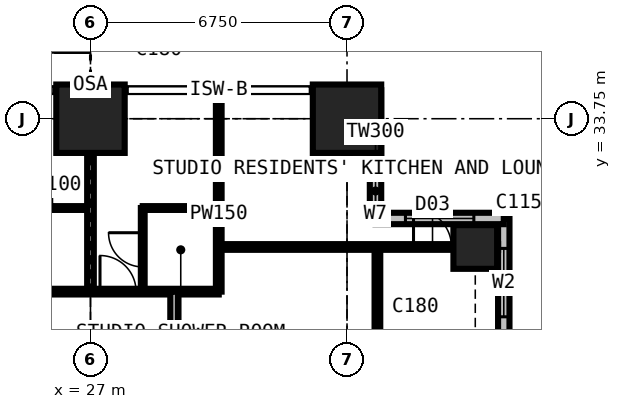
"""IFC4 building model, lengths in metres.
Left out: names, types, materials, properties, quantities, classifications, styles, units other than length and angle.
Written with IfcOpenShell. Run it as: python <this file> out.ifc"""

import sys

from ifc_helpers import new_model, si_unit, direction, frame, frame_2d, origin, origin_2d, place, context, subcontext, project, spatial, rectangle, extrude, element, fill, save


model = new_model("IFC4")
c1 = context("Model", 3, precision=1e-05, world=origin(), true_north=direction((0.0, 1.0)))
c2 = subcontext(c1, "Body", "Model", "MODEL_VIEW")
j1 = project(units=[si_unit("LENGTHUNIT", "METRE"), si_unit("PLANEANGLEUNIT", "RADIAN")], contexts=[c1])
p1 = place(None, origin())
s1 = spatial("IfcSite", under=j1, at=p1, CompositionType="ELEMENT")
p2 = place(p1, origin())
s2 = spatial("IfcBuilding", under=s1, at=p2, CompositionType="ELEMENT")
p3 = place(p2, frame((0.0, 0.0, 87.3)))
s3 = spatial("IfcBuildingStorey", under=s2, at=p3, CompositionType="ELEMENT", Elevation=87.3)
for number, where, z_axis, x_axis in (
    (1, (27.0, 33.75, 0.0), (0.0, 0.0, 1.0), (1.0, 0.0, 0.0)),
    (2, (33.75, 33.75, 0.0), (0.0, 0.0, 1.0), (1.0, 0.0, 0.0)),
):
    element("IfcColumn", number, at=place(p3, frame(where, z_axis=z_axis, x_axis=x_axis)), inside=s3, PredefinedType="COLUMN", context=c2, shape_type="SweptSolid", body=[
        extrude(rectangle(XDim=1.8, YDim=1.8, at=origin_2d()), origin(), (0.0, 0.0, 1.0), 3.6),
    ])
p4 = place(p3, frame((37.125, 30.375, 0.0), z_axis=(0.0, 0.0, 1.0), x_axis=(1.0, 0.0, 0.0)))
e3 = element("IfcColumn", 3, at=p4, inside=s3, PredefinedType="COLUMN", context=c2, shape_type="SweptSolid", body=[
    extrude(rectangle(XDim=1.15, YDim=1.15, at=origin_2d()), origin(), (0.0, 0.0, 1.0), 3.6),
])
p5 = place(p3, frame((37.875, 27.75, 0.0), z_axis=(0.0, 0.0, 1.0), x_axis=(0.0, 1.0, 0.0)))
e4 = element("IfcWall", 4, at=p5, inside=s3, PredefinedType="SOLIDWALL", context=c2, shape_type="SweptSolid", body=[
    extrude(rectangle(XDim=3.375, YDim=0.3, at=frame_2d((1.688, 0.0))), origin(), (0.0, 0.0, 1.0), 3.375),
])
p6 = place(p5, frame((0.788, 0.0, 0.6)))
e5 = element("IfcOpeningElement", 5, at=p6, cuts=e4, PredefinedType="OPENING", context=c2, shape_type="SweptSolid", body=[
    extrude(rectangle(XDim=1.8, YDim=2.1, at=frame_2d((0.9, 1.05))), frame((0.0, 0.16, 0.0), z_axis=(0.0, -1.0, 0.0), x_axis=(1.0, 0.0, 0.0)), (0.0, 0.0, 1.0), 0.32),
])
p7 = place(p3, frame((37.875, 31.125, 0.0), z_axis=(0.0, 0.0, 1.0), x_axis=(-1.0, 0.0, 0.0)))
e6 = element("IfcWall", 6, at=p7, inside=s3, PredefinedType="SOLIDWALL", context=c2, shape_type="SweptSolid", body=[
    extrude(rectangle(XDim=3.375, YDim=0.3, at=frame_2d((1.688, 0.0))), origin(), (0.0, 0.0, 1.0), 3.375),
])
p8 = place(p7, frame((0.788, 0.0, 0.6)))
e7 = element("IfcOpeningElement", 7, at=p8, cuts=e6, PredefinedType="OPENING", context=c2, shape_type="SweptSolid", body=[
    extrude(rectangle(XDim=1.8, YDim=2.1, at=frame_2d((0.9, 1.05))), frame((0.0, 0.16, 0.0), z_axis=(0.0, -1.0, 0.0), x_axis=(1.0, 0.0, 0.0)), (0.0, 0.0, 1.0), 0.32),
])
p9 = place(p3, frame((34.5, 31.125, 0.0), z_axis=(0.0, 0.0, 1.0), x_axis=(0.0, 1.0, 0.0)))
e8 = element("IfcWall", 8, at=p9, inside=s3, PredefinedType="SOLIDWALL", context=c2, shape_type="SweptSolid", body=[
    extrude(rectangle(XDim=3.375, YDim=0.3, at=frame_2d((1.688, 0.0))), origin(), (0.0, 0.0, 1.0), 3.375),
])
p10 = place(p9, frame((0.272, 0.0, 0.9)))
e9 = element("IfcOpeningElement", 9, at=p10, cuts=e8, PredefinedType="OPENING", context=c2, shape_type="SweptSolid", body=[
    extrude(rectangle(XDim=0.9, YDim=1.8, at=frame_2d((0.45, 0.9))), frame((0.0, 0.16, 0.0), z_axis=(0.0, -1.0, 0.0), x_axis=(1.0, 0.0, 0.0)), (0.0, 0.0, 1.0), 0.32),
])
p11 = place(p3, frame((11.3, 29.2, 0.0), z_axis=(0.0, 0.0, 1.0), x_axis=(1.0, 0.0, 0.0)))
e10 = element("IfcWall", 10, at=p11, inside=s3, PredefinedType="PARTITIONING", context=c2, shape_type="SweptSolid", body=[
    extrude(rectangle(XDim=19.075, YDim=0.15, at=frame_2d((9.538, 0.0))), origin(), (0.0, 0.0, 1.0), 3.375),
])
p12 = place(p11, frame((5.825, 0.0, 0.0)))
e11 = element("IfcOpeningElement", 11, at=p12, cuts=e10, PredefinedType="OPENING", context=c2, shape_type="SweptSolid", body=[
    extrude(rectangle(XDim=0.95, YDim=2.2, at=frame_2d((0.475, 1.1))), frame((0.0, 0.085, 0.0), z_axis=(0.0, -1.0, 0.0), x_axis=(1.0, 0.0, 0.0)), (0.0, 0.0, 1.0), 0.17),
])
p13 = place(p11, frame((9.2, 0.0, 0.0)))
e12 = element("IfcOpeningElement", 12, at=p13, cuts=e10, PredefinedType="OPENING", context=c2, shape_type="SweptSolid", body=[
    extrude(rectangle(XDim=0.95, YDim=2.2, at=frame_2d((0.475, 1.1))), frame((0.0, 0.085, 0.0), z_axis=(0.0, -1.0, 0.0), x_axis=(1.0, 0.0, 0.0)), (0.0, 0.0, 1.0), 0.17),
])
p14 = place(p11, frame((12.575, 0.0, 0.0)))
e13 = element("IfcOpeningElement", 13, at=p14, cuts=e10, PredefinedType="OPENING", context=c2, shape_type="SweptSolid", body=[
    extrude(rectangle(XDim=0.95, YDim=2.2, at=frame_2d((0.475, 1.1))), frame((0.0, 0.085, 0.0), z_axis=(0.0, -1.0, 0.0), x_axis=(1.0, 0.0, 0.0)), (0.0, 0.0, 1.0), 0.17),
])
p15 = place(p11, frame((15.95, 0.0, 0.0)))
e14 = element("IfcOpeningElement", 14, at=p15, cuts=e10, PredefinedType="OPENING", context=c2, shape_type="SweptSolid", body=[
    extrude(rectangle(XDim=0.95, YDim=2.2, at=frame_2d((0.475, 1.1))), frame((0.0, 0.085, 0.0), z_axis=(0.0, -1.0, 0.0), x_axis=(1.0, 0.0, 0.0)), (0.0, 0.0, 1.0), 0.17),
])
p16 = place(p11, frame((0.6, 0.0, 0.0)))
e15 = element("IfcOpeningElement", 15, at=p16, cuts=e10, PredefinedType="OPENING", context=c2, shape_type="SweptSolid", body=[
    extrude(rectangle(XDim=1.0, YDim=2.2, at=frame_2d((0.5, 1.1))), frame((0.0, 0.085, 0.0), z_axis=(0.0, -1.0, 0.0), x_axis=(1.0, 0.0, 0.0)), (0.0, 0.0, 1.0), 0.17),
])
p17 = place(p3, frame((25.0, 31.4, 0.0), z_axis=(0.0, 0.0, 1.0), x_axis=(1.0, 0.0, 0.0)))
e16 = element("IfcWall", 16, at=p17, inside=s3, PredefinedType="PARTITIONING", context=c2, shape_type="SweptSolid", body=[
    extrude(rectangle(XDim=2.0, YDim=0.1, at=frame_2d((1.0, 0.0))), origin(), (0.0, 0.0, 1.0), 3.375),
])
p18 = place(p3, frame((27.0, 29.2, 0.0), z_axis=(0.0, 0.0, 1.0), x_axis=(0.0, 1.0, 0.0)))
e17 = element("IfcWall", 17, at=p18, inside=s3, PredefinedType="PARTITIONING", context=c2, shape_type="SweptSolid", body=[
    extrude(rectangle(XDim=5.284, YDim=0.175, at=frame_2d((2.642, 0.0))), origin(), (0.0, 0.0, 1.0), 2.61),
])
p19 = place(p3, frame((28.375, 29.2, 0.0), z_axis=(0.0, 0.0, 1.0), x_axis=(0.0, 1.0, 0.0)))
e18 = element("IfcWall", 18, at=p19, inside=s3, PredefinedType="PARTITIONING", context=c2, shape_type="SweptSolid", body=[
    extrude(rectangle(XDim=2.2, YDim=0.1, at=frame_2d((1.1, 0.0))), origin(), (0.0, 0.0, 1.0), 3.375),
])
p20 = place(p19, frame((0.65, 0.0, 0.0)))
e19 = element("IfcOpeningElement", 19, at=p20, cuts=e18, PredefinedType="OPENING", context=c2, shape_type="SweptSolid", body=[
    extrude(rectangle(XDim=0.9, YDim=2.2, at=frame_2d((0.45, 1.1))), frame((0.0, 0.06, 0.0), z_axis=(0.0, -1.0, 0.0), x_axis=(1.0, 0.0, 0.0)), (0.0, 0.0, 1.0), 0.12),
])
p21 = place(p3, frame((28.375, 31.4, 0.0), z_axis=(0.0, 0.0, 1.0), x_axis=(1.0, 0.0, 0.0)))
e20 = element("IfcWall", 20, at=p21, inside=s3, PredefinedType="PARTITIONING", context=c2, shape_type="SweptSolid", body=[
    extrude(rectangle(XDim=2.0, YDim=0.1, at=frame_2d((1.0, 0.0))), origin(), (0.0, 0.0, 1.0), 3.375),
])
p22 = place(p3, frame((29.2, 11.3, 0.0), z_axis=(0.0, 0.0, 1.0), x_axis=(0.0, 1.0, 0.0)))
e21 = element("IfcWall", 21, at=p22, inside=s3, PredefinedType="PARTITIONING", context=c2, shape_type="SweptSolid", body=[
    extrude(rectangle(XDim=17.9, YDim=0.2, at=frame_2d((8.95, 0.0))), origin(), (0.0, 0.0, 1.0), 3.375),
])
p23 = place(p22, frame((8.35, 0.0, 0.0)))
e22 = element("IfcOpeningElement", 22, at=p23, cuts=e21, PredefinedType="OPENING", context=c2, shape_type="SweptSolid", body=[
    extrude(rectangle(XDim=1.2, YDim=2.2, at=frame_2d((0.6, 1.1))), frame((0.0, 0.11, 0.0), z_axis=(0.0, -1.0, 0.0), x_axis=(1.0, 0.0, 0.0)), (0.0, 0.0, 1.0), 0.22),
])
p24 = place(p3, frame((30.375, 29.2, 0.0), z_axis=(0.0, 0.0, 1.0), x_axis=(0.0, 1.0, 0.0)))
e23 = element("IfcWall", 23, at=p24, inside=s3, PredefinedType="PARTITIONING", context=c2, shape_type="SweptSolid", body=[
    extrude(rectangle(XDim=5.284, YDim=0.15, at=frame_2d((2.642, 0.0))), origin(), (0.0, 0.0, 1.0), 3.375),
])
p25 = place(p3, frame((30.375, 30.375, 0.0), z_axis=(0.0, 0.0, 1.0), x_axis=(1.0, 0.0, 0.0)))
e24 = element("IfcWall", 24, at=p25, inside=s3, PredefinedType="PARTITIONING", context=c2, shape_type="SweptSolid", body=[
    extrude(rectangle(XDim=7.35, YDim=0.15, at=frame_2d((3.675, 0.0))), origin(), (0.0, 0.0, 1.0), 2.877),
])
p26 = place(p25, frame((5.125, 0.0, 0.0)))
e25 = element("IfcOpeningElement", 25, at=p26, cuts=e24, PredefinedType="OPENING", context=c2, shape_type="SweptSolid", body=[
    extrude(rectangle(XDim=1.0, YDim=2.2, at=frame_2d((0.5, 1.1))), frame((0.0, 0.085, 0.0), z_axis=(0.0, -1.0, 0.0), x_axis=(1.0, 0.0, 0.0)), (0.0, 0.0, 1.0), 0.17),
])
p27 = place(p3, frame((33.75, 32.57, 0.0), z_axis=(0.0, 0.0, 1.0), x_axis=(0.0, 1.0, 0.0)))
e26 = element("IfcWall", 26, at=p27, inside=s3, PredefinedType="PARTITIONING", context=c2, shape_type="SweptSolid", body=[
    extrude(rectangle(XDim=1.914, YDim=0.15, at=frame_2d((0.957, 0.0))), origin(), (0.0, 0.0, 1.0), 2.877),
])
p28 = place(p3, frame((33.75, 32.57, 0.0), z_axis=(0.0, 0.0, 1.0), x_axis=(1.0, 0.0, 0.0)))
e27 = element("IfcWall", 27, at=p28, inside=s3, PredefinedType="PARTITIONING", context=c2, shape_type="SweptSolid", body=[
    extrude(rectangle(XDim=0.734, YDim=0.15, at=frame_2d((0.367, 0.0))), origin(), (0.0, 0.0, 1.0), 3.375),
])
p29 = place(p3, frame((34.55, 27.725, 0.0), z_axis=(0.0, 0.0, 1.0), x_axis=(0.0, 1.0, 0.0)))
e28 = element("IfcWall", 28, at=p29, inside=s3, PredefinedType="PARTITIONING", context=c2, shape_type="SweptSolid", body=[
    extrude(rectangle(XDim=2.65, YDim=0.15, at=frame_2d((1.325, 0.0))), origin(), (0.0, 0.0, 1.0), 3.375),
])
p30 = place(p6, origin())
e29 = element("IfcWindow", 29, at=p30, inside=s3, PartitioningType="SINGLE_PANEL", PredefinedType="WINDOW", context=c2, shape_type="SweptSolid", body=[
    extrude(rectangle(XDim=1.8, YDim=2.1, at=frame_2d((0.9, 1.05))), frame((0.0, 0.03, 0.0), z_axis=(0.0, -1.0, 0.0), x_axis=(1.0, 0.0, 0.0)), (0.0, 0.0, 1.0), 0.06),
])
fill(e5, e29)
p31 = place(p8, origin())
e30 = element("IfcWindow", 30, at=p31, inside=s3, PartitioningType="SINGLE_PANEL", PredefinedType="WINDOW", context=c2, shape_type="SweptSolid", body=[
    extrude(rectangle(XDim=1.8, YDim=2.1, at=frame_2d((0.9, 1.05))), frame((0.0, 0.03, 0.0), z_axis=(0.0, -1.0, 0.0), x_axis=(1.0, 0.0, 0.0)), (0.0, 0.0, 1.0), 0.06),
])
fill(e7, e30)
p32 = place(p10, origin())
e31 = element("IfcWindow", 31, at=p32, inside=s3, PartitioningType="SINGLE_PANEL", PredefinedType="WINDOW", context=c2, shape_type="SweptSolid", body=[
    extrude(rectangle(XDim=0.9, YDim=1.8, at=frame_2d((0.45, 0.9))), frame((0.0, 0.03, 0.0), z_axis=(0.0, -1.0, 0.0), x_axis=(1.0, 0.0, 0.0)), (0.0, 0.0, 1.0), 0.06),
])
fill(e9, e31)
p33 = place(p26, origin())
e32 = element("IfcDoor", 32, at=p33, inside=s3, OperationType="SINGLE_SWING_LEFT", PredefinedType="DOOR", context=c2, shape_type="SweptSolid", body=[
    extrude(rectangle(XDim=1.0, YDim=2.2, at=frame_2d((0.5, 1.1))), frame((0.0, 0.025, 0.0), z_axis=(0.0, -1.0, 0.0), x_axis=(1.0, 0.0, 0.0)), (0.0, 0.0, 1.0), 0.05),
])
fill(e25, e32)
p34 = place(p15, origin())
e33 = element("IfcDoor", 33, at=p34, inside=s3, OperationType="SINGLE_SWING_LEFT", PredefinedType="DOOR", context=c2, shape_type="SweptSolid", body=[
    extrude(rectangle(XDim=0.95, YDim=2.2, at=frame_2d((0.475, 1.1))), frame((0.0, 0.025, 0.0), z_axis=(0.0, -1.0, 0.0), x_axis=(1.0, 0.0, 0.0)), (0.0, 0.0, 1.0), 0.05),
])
fill(e14, e33)
p35 = place(p20, origin())
e34 = element("IfcDoor", 34, at=p35, inside=s3, OperationType="SINGLE_SWING_RIGHT", PredefinedType="DOOR", context=c2, shape_type="SweptSolid", body=[
    extrude(rectangle(XDim=0.9, YDim=2.2, at=frame_2d((0.45, 1.1))), frame((0.0, 0.025, 0.0), z_axis=(0.0, -1.0, 0.0), x_axis=(1.0, 0.0, 0.0)), (0.0, 0.0, 1.0), 0.05),
])
fill(e19, e34)
save(model, sys.argv[1])
